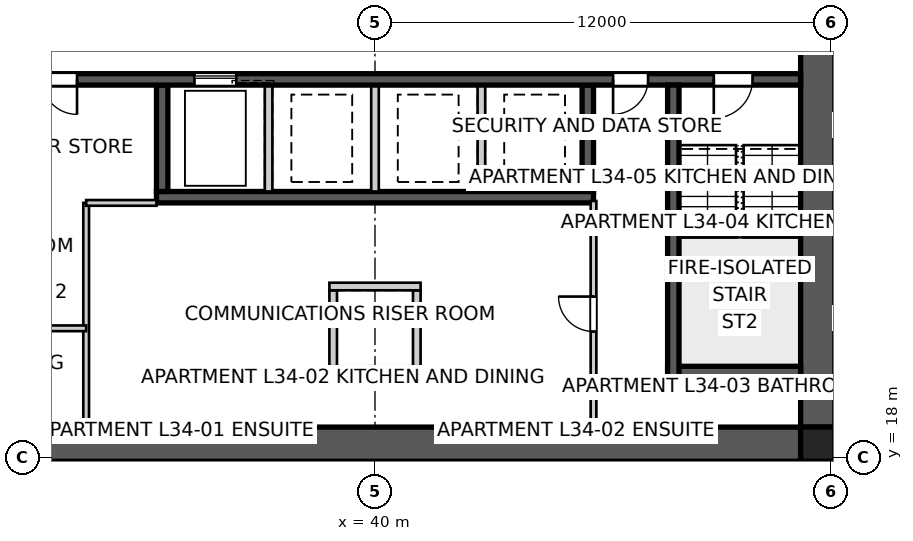
"""IFC4 building model, lengths in metres.
Left out: names, types, materials, properties, quantities, classifications, styles, units other than length and angle.
Written with IfcOpenShell. Run it as: python <this file> out.ifc"""

import sys

from ifc_helpers import new_model, si_unit, direction, frame, frame_2d, origin, origin_2d, place, context, subcontext, project, spatial, polyline, rectangle, outline, extrude, element, fill, save


model = new_model("IFC4")
c1 = context("Model", 3, precision=1e-05, world=origin(), true_north=direction((0.0, 1.0)))
c2 = subcontext(c1, "Body", "Model", "MODEL_VIEW")
j1 = project(units=[si_unit("LENGTHUNIT", "METRE"), si_unit("PLANEANGLEUNIT", "RADIAN")], contexts=[c1])
p1 = place(None, origin())
s1 = spatial("IfcSite", under=j1, at=p1, CompositionType="ELEMENT")
p2 = place(p1, origin())
s2 = spatial("IfcBuilding", under=s1, at=p2, CompositionType="ELEMENT")
p3 = place(p2, frame((0.0, 0.0, 125.2)))
s3 = spatial("IfcBuildingStorey", under=s2, at=p3, CompositionType="ELEMENT", Elevation=125.2)
p4 = place(p3, frame((51.2, 18.35, 0.0), z_axis=(0.0, 0.0, 1.0), x_axis=(-1.0, 0.0, 0.0)))
e1 = element("IfcWall", 1, at=p4, inside=s3, PredefinedType="SHEAR", context=c2, shape_type="SweptSolid", body=[
    extrude(outline(polyline([(0.0, -0.45), (22.4, -0.45), (22.4, -0.025), (22.85, -0.025), (22.85, 0.025), (22.4, 0.025), (22.4, 0.45), (0.0, 0.45), (0.0, 0.025), (-0.45, 0.025), (-0.45, -0.025), (0.0, -0.025), (0.0, -0.45)])), origin(), (0.0, 0.0, 1.0), 3.4),
])
p5 = place(p3, frame((51.65, 18.8, 0.0), z_axis=(0.0, 0.0, 1.0), x_axis=(0.0, 1.0, 0.0)))
e2 = element("IfcWall", 2, at=p5, inside=s3, PredefinedType="SHEAR", context=c2, shape_type="SweptSolid", body=[
    extrude(outline(polyline([(0.0, -0.45), (22.4, -0.45), (22.4, -0.025), (22.85, -0.025), (22.85, 0.025), (22.4, 0.025), (22.4, 0.45), (0.0, 0.45), (0.0, 0.025), (-0.45, 0.025), (-0.45, -0.025), (0.0, -0.025), (0.0, -0.45)])), origin(), (0.0, 0.0, 1.0), 3.4),
])
p6 = place(p5, frame((11.14, 0.0, 0.0)))
e3 = element("IfcOpeningElement", 3, at=p6, cuts=e2, PredefinedType="OPENING", context=c2, shape_type="SweptSolid", body=[
    extrude(rectangle(XDim=1.02, YDim=2.4, at=frame_2d((0.51, 1.2))), frame((0.0, 0.46, 0.0), z_axis=(0.0, -1.0, 0.0), x_axis=(1.0, 0.0, 0.0)), (0.0, 0.0, 1.0), 0.92),
])
p7 = place(p3, frame((51.2, 27.95, 0.0), z_axis=(0.0, 0.0, 1.0), x_axis=(-1.0, 0.0, 0.0)))
e4 = element("IfcWall", 4, at=p7, inside=s3, PredefinedType="SHEAR", context=c2, shape_type="SweptSolid", body=[
    extrude(rectangle(XDim=22.4, YDim=0.3, at=frame_2d((11.2, 0.0))), origin(), (0.0, 0.0, 1.0), 3.4),
])
p8 = place(p7, frame((19.04, 0.0, 0.0)))
e5 = element("IfcOpeningElement", 5, at=p8, cuts=e4, PredefinedType="OPENING", context=c2, shape_type="SweptSolid", body=[
    extrude(rectangle(XDim=0.92, YDim=2.1, at=frame_2d((0.46, 1.05))), frame((0.0, 0.16, 0.0), z_axis=(0.0, -1.0, 0.0), x_axis=(1.0, 0.0, 0.0)), (0.0, 0.0, 1.0), 0.32),
])
p9 = place(p7, frame((1.265, 0.0, 0.0)))
e6 = element("IfcOpeningElement", 6, at=p9, cuts=e4, PredefinedType="OPENING", context=c2, shape_type="SweptSolid", body=[
    extrude(rectangle(XDim=1.02, YDim=2.1, at=frame_2d((0.51, 1.05))), frame((0.0, 0.16, 0.0), z_axis=(0.0, -1.0, 0.0), x_axis=(1.0, 0.0, 0.0)), (0.0, 0.0, 1.0), 0.32),
])
p10 = place(p7, frame((4.015, 0.0, 0.0)))
e7 = element("IfcOpeningElement", 7, at=p10, cuts=e4, PredefinedType="OPENING", context=c2, shape_type="SweptSolid", body=[
    extrude(rectangle(XDim=0.92, YDim=2.1, at=frame_2d((0.46, 1.05))), frame((0.0, 0.16, 0.0), z_axis=(0.0, -1.0, 0.0), x_axis=(1.0, 0.0, 0.0)), (0.0, 0.0, 1.0), 0.32),
])
p11 = place(p7, frame((14.85, 0.0, 0.0)))
e8 = element("IfcOpeningElement", 8, at=p11, cuts=e4, PredefinedType="OPENING", context=c2, shape_type="SweptSolid", body=[
    extrude(rectangle(XDim=1.1, YDim=2.1, at=frame_2d((0.55, 1.05))), frame((0.0, 0.16, 0.0), z_axis=(0.0, -1.0, 0.0), x_axis=(1.0, 0.0, 0.0)), (0.0, 0.0, 1.0), 0.32),
])
p12 = place(p3, frame((45.75, 24.85, 0.0), z_axis=(0.0, 0.0, 1.0), x_axis=(-1.0, 0.0, 0.0)))
e9 = element("IfcWall", 9, at=p12, inside=s3, PredefinedType="SHEAR", context=c2, shape_type="SweptSolid", body=[
    extrude(rectangle(XDim=11.5, YDim=0.3, at=frame_2d((5.75, 0.0))), origin(), (0.0, 0.0, 1.0), 3.4),
])
p13 = place(p3, frame((45.6, 27.8, 0.0), z_axis=(0.0, 0.0, 1.0), x_axis=(0.0, -1.0, 0.0)))
e10 = element("IfcWall", 10, at=p13, inside=s3, PredefinedType="SHEAR", context=c2, shape_type="SweptSolid", body=[
    extrude(rectangle(XDim=2.8, YDim=0.3, at=frame_2d((1.4, 0.0))), origin(), (0.0, 0.0, 1.0), 3.4),
])
for number, where, z_axis, x_axis in (
    (11, (42.8, 27.8, 0.0), (0.0, 0.0, 1.0), (0.0, -1.0, 0.0)),
    (12, (40.0, 27.8, 0.0), (0.0, 0.0, 1.0), (0.0, -1.0, 0.0)),
    (13, (37.2, 27.8, 0.0), (0.0, 0.0, 1.0), (0.0, -1.0, 0.0)),
):
    element("IfcWall", number, at=place(p3, frame(where, z_axis=z_axis, x_axis=x_axis)), inside=s3, PredefinedType="SOLIDWALL", context=c2, shape_type="SweptSolid", body=[
        extrude(rectangle(XDim=2.8, YDim=0.2, at=frame_2d((1.4, 0.0))), origin(), (0.0, 0.0, 1.0), 3.4),
    ])
p14 = place(p3, frame((34.4, 27.8, 0.0), z_axis=(0.0, 0.0, 1.0), x_axis=(0.0, -1.0, 0.0)))
e14 = element("IfcWall", 14, at=p14, inside=s3, PredefinedType="SHEAR", context=c2, shape_type="SweptSolid", body=[
    extrude(rectangle(XDim=2.8, YDim=0.3, at=frame_2d((1.4, 0.0))), origin(), (0.0, 0.0, 1.0), 3.4),
])
p15 = place(p3, frame((47.85, 27.8, 0.0), z_axis=(0.0, 0.0, 1.0), x_axis=(0.0, -1.0, 0.0)))
e15 = element("IfcWall", 15, at=p15, inside=s3, PredefinedType="SHEAR", context=c2, shape_type="SweptSolid", body=[
    extrude(rectangle(XDim=7.7, YDim=0.3, at=frame_2d((3.85, 0.0))), origin(), (0.0, 0.0, 1.0), 3.4),
])
p16 = place(p3, frame((51.2, 20.25, 0.0), z_axis=(0.0, 0.0, 1.0), x_axis=(-1.0, 0.0, 0.0)))
e16 = element("IfcWall", 16, at=p16, inside=s3, PredefinedType="SHEAR", context=c2, shape_type="SweptSolid", body=[
    extrude(rectangle(XDim=3.5, YDim=0.3, at=frame_2d((1.75, 0.0))), origin(), (0.0, 0.0, 1.0), 3.4),
])
for number, where, z_axis, x_axis in (
    (17, (38.9, 22.4, 0.0), (0.0, 0.0, 1.0), (0.0, -1.0, 0.0)),
    (18, (41.1, 22.4, 0.0), (0.0, 0.0, 1.0), (0.0, -1.0, 0.0)),
):
    element("IfcWall", number, at=place(p3, frame(where, z_axis=z_axis, x_axis=x_axis)), inside=s3, PredefinedType="SOLIDWALL", context=c2, shape_type="SweptSolid", body=[
        extrude(rectangle(XDim=2.0, YDim=0.2, at=frame_2d((1.0, 0.0))), origin(), (0.0, 0.0, 1.0), 3.4),
    ])
for number, where, z_axis, x_axis in (
    (19, (38.8, 22.5, 0.0), (0.0, 0.0, 1.0), (1.0, 0.0, 0.0)),
    (20, (38.8, 20.3, 0.0), (0.0, 0.0, 1.0), (1.0, 0.0, 0.0)),
):
    element("IfcWall", number, at=place(p3, frame(where, z_axis=z_axis, x_axis=x_axis)), inside=s3, PredefinedType="SOLIDWALL", context=c2, shape_type="SweptSolid", body=[
        extrude(rectangle(XDim=2.4, YDim=0.2, at=frame_2d((1.2, 0.0))), origin(), (0.0, 0.0, 1.0), 3.4),
    ])
p17 = place(p3, frame((51.65, 18.35, 0.0), z_axis=(0.0, 0.0, 1.0), x_axis=(1.0, 0.0, 0.0)))
e21 = element("IfcColumn", 21, at=p17, inside=s3, PredefinedType="COLUMN", context=c2, shape_type="SweptSolid", body=[
    extrude(rectangle(XDim=0.9, YDim=0.9, at=origin_2d()), origin(), (0.0, 0.0, 1.0), 3.4),
])
p18 = place(p3, frame((45.75, 18.8, 0.0), z_axis=(0.0, 0.0, 1.0), x_axis=(0.0, 1.0, 0.0)))
e22 = element("IfcWall", 22, at=p18, inside=s3, PredefinedType="SOLIDWALL", context=c2, shape_type="SweptSolid", body=[
    extrude(rectangle(XDim=5.95, YDim=0.15, at=frame_2d((2.975, 0.0))), origin(), (0.0, 0.0, 1.0), 3.25),
])
p19 = place(p18, frame((2.515, 0.0, 0.0)))
e23 = element("IfcOpeningElement", 23, at=p19, cuts=e22, PredefinedType="OPENING", context=c2, shape_type="SweptSolid", body=[
    extrude(rectangle(XDim=0.92, YDim=2.1, at=frame_2d((0.46, 1.05))), frame((0.0, 0.085, 0.0), z_axis=(0.0, -1.0, 0.0), x_axis=(1.0, 0.0, 0.0)), (0.0, 0.0, 1.0), 0.17),
])
p20 = place(p3, frame((32.4, 18.8, 0.0), z_axis=(0.0, 0.0, 1.0), x_axis=(0.0, 1.0, 0.0)))
e24 = element("IfcWall", 24, at=p20, inside=s3, PredefinedType="SOLIDWALL", context=c2, shape_type="SweptSolid", body=[
    extrude(rectangle(XDim=5.9, YDim=0.15, at=frame_2d((2.95, 0.0))), origin(), (0.0, 0.0, 1.0), 3.25),
])
p21 = place(p3, frame((32.4, 24.7, 0.0), z_axis=(0.0, 0.0, 1.0), x_axis=(1.0, 0.0, 0.0)))
e25 = element("IfcWall", 25, at=p21, inside=s3, PredefinedType="SOLIDWALL", context=c2, shape_type="SweptSolid", body=[
    extrude(rectangle(XDim=1.85, YDim=0.15, at=frame_2d((0.925, 0.0))), origin(), (0.0, 0.0, 1.0), 3.25),
])
p22 = place(p3, frame((32.4, 21.4, 0.0), z_axis=(0.0, 0.0, 1.0), x_axis=(-1.0, 0.0, 0.0)))
e26 = element("IfcWall", 26, at=p22, inside=s3, PredefinedType="SOLIDWALL", context=c2, shape_type="SweptSolid", body=[
    extrude(rectangle(XDim=3.6, YDim=0.15, at=frame_2d((1.8, 0.0))), origin(), (0.0, 0.0, 1.0), 3.25),
])
p23 = place(p22, frame((1.34, 0.0, 0.0)))
e27 = element("IfcOpeningElement", 27, at=p23, cuts=e26, PredefinedType="OPENING", context=c2, shape_type="SweptSolid", body=[
    extrude(rectangle(XDim=0.92, YDim=2.1, at=frame_2d((0.46, 1.05))), frame((0.0, 0.085, 0.0), z_axis=(0.0, -1.0, 0.0), x_axis=(1.0, 0.0, 0.0)), (0.0, 0.0, 1.0), 0.17),
])
p24 = place(p8, origin())
e28 = element("IfcDoor", 28, at=p24, inside=s3, OperationType="SINGLE_SWING_LEFT", PredefinedType="DOOR", context=c2, shape_type="SweptSolid", body=[
    extrude(rectangle(XDim=0.92, YDim=2.1, at=frame_2d((0.46, 1.05))), frame((0.0, 0.025, 0.0), z_axis=(0.0, -1.0, 0.0), x_axis=(1.0, 0.0, 0.0)), (0.0, 0.0, 1.0), 0.05),
])
fill(e5, e28)
p25 = place(p9, origin())
e29 = element("IfcDoor", 29, at=p25, inside=s3, OperationType="SINGLE_SWING_RIGHT", PredefinedType="DOOR", context=c2, shape_type="SweptSolid", body=[
    extrude(rectangle(XDim=1.02, YDim=2.1, at=frame_2d((0.51, 1.05))), frame((0.0, 0.025, 0.0), z_axis=(0.0, -1.0, 0.0), x_axis=(1.0, 0.0, 0.0)), (0.0, 0.0, 1.0), 0.05),
])
fill(e6, e29)
p26 = place(p10, origin())
e30 = element("IfcDoor", 30, at=p26, inside=s3, OperationType="SINGLE_SWING_RIGHT", PredefinedType="DOOR", context=c2, shape_type="SweptSolid", body=[
    extrude(rectangle(XDim=0.92, YDim=2.1, at=frame_2d((0.46, 1.05))), frame((0.0, 0.025, 0.0), z_axis=(0.0, -1.0, 0.0), x_axis=(1.0, 0.0, 0.0)), (0.0, 0.0, 1.0), 0.05),
])
fill(e7, e30)
p27 = place(p19, origin())
e31 = element("IfcDoor", 31, at=p27, inside=s3, OperationType="SINGLE_SWING_RIGHT", PredefinedType="DOOR", context=c2, shape_type="SweptSolid", body=[
    extrude(rectangle(XDim=0.92, YDim=2.1, at=frame_2d((0.46, 1.05))), frame((0.0, 0.025, 0.0), z_axis=(0.0, -1.0, 0.0), x_axis=(1.0, 0.0, 0.0)), (0.0, 0.0, 1.0), 0.05),
])
fill(e23, e31)
p28 = place(p11, origin())
e32 = element("IfcDoor", 32, at=p28, inside=s3, OperationType="SLIDING_TO_LEFT", PredefinedType="DOOR", context=c2, shape_type="SweptSolid", body=[
    extrude(rectangle(XDim=1.1, YDim=2.1, at=frame_2d((0.55, 1.05))), frame((0.0, 0.025, 0.0), z_axis=(0.0, -1.0, 0.0), x_axis=(1.0, 0.0, 0.0)), (0.0, 0.0, 1.0), 0.05),
])
fill(e8, e32)
save(model, sys.argv[1])
